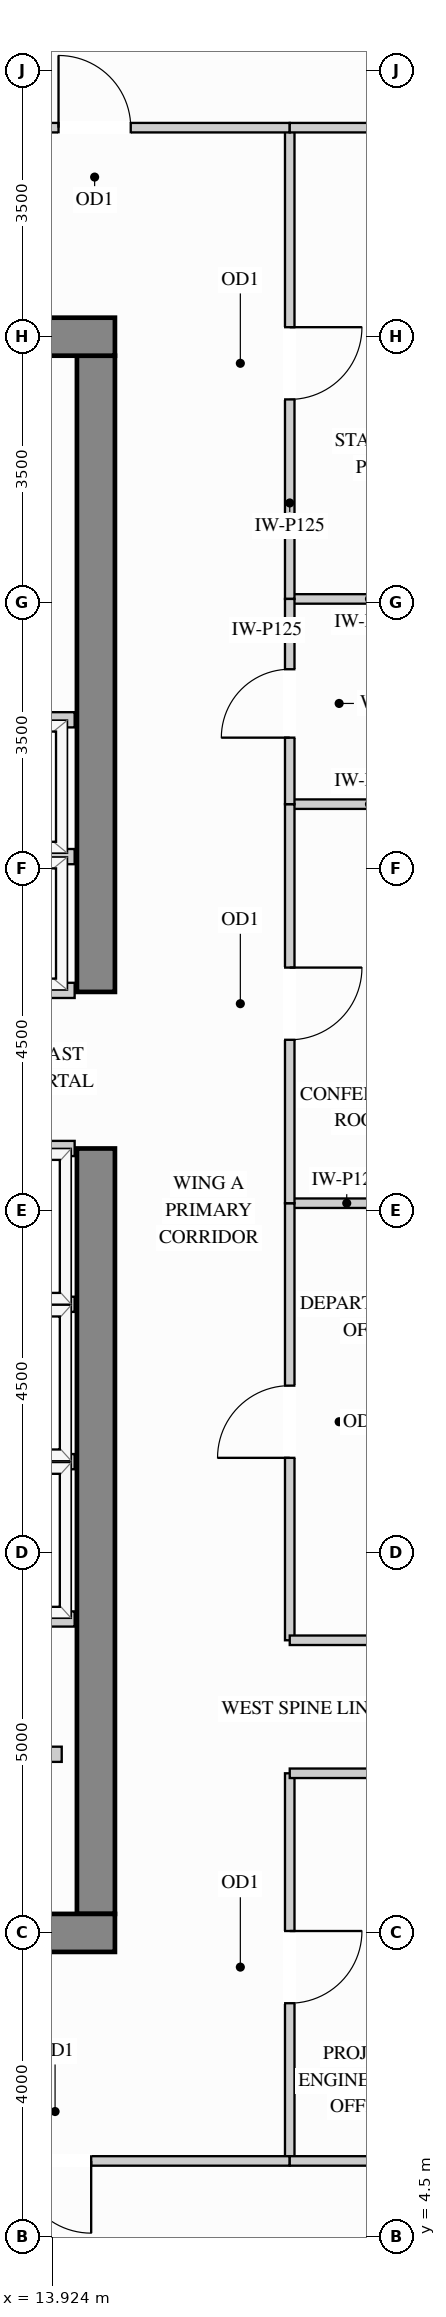
"""IFC4 building model, lengths in metres.
Left out: names, types, materials, properties, quantities, classifications, styles, units other than length and angle.
Written with IfcOpenShell. Run it as: python <this file> out.ifc"""

import sys

from ifc_helpers import new_model, si_unit, direction, frame, frame_2d, origin, place, context, subcontext, project, spatial, rectangle, extrude, source, transform, mapped, element, fill, save


model = new_model("IFC4")
c1 = context("Model", 3, precision=1e-05, world=origin(), true_north=direction((0.0, 1.0)))
c2 = subcontext(c1, "Body", "Model", "MODEL_VIEW")
j1 = project(units=[si_unit("LENGTHUNIT", "METRE"), si_unit("PLANEANGLEUNIT", "RADIAN")], contexts=[c1])
p1 = place(None, origin())
s1 = spatial("IfcSite", under=j1, at=p1, CompositionType="ELEMENT")
p2 = place(p1, origin())
s2 = spatial("IfcBuilding", under=s1, at=p2, CompositionType="ELEMENT")
p3 = place(p2, frame((0.0, 0.0, 237.6)))
s3 = spatial("IfcBuildingStorey", under=s2, at=p3, CompositionType="ELEMENT", Elevation=237.6)
m1 = source(origin(), c2, "Body", "SweptSolid", [
    extrude(rectangle(XDim=10.07, YDim=0.5, at=frame_2d((5.035, 0.0))), origin(), (0.0, 0.0, 1.0), 3.4),
])
p4 = place(p3, frame((14.5, 8.75, 0.0), z_axis=(0.0, 0.0, 1.0), x_axis=(0.0, 1.0, 0.0)))
e1 = element("IfcWall", 1, at=p4, inside=s3, PredefinedType="SHEAR", context=c2, shape_type="MappedRepresentation", body=[
    mapped(m1, transform((0.0, 0.0, 0.0), x_axis=(1.0, 0.0, 0.0), y_axis=(0.0, 1.0, 0.0), z_axis=(0.0, 0.0, 1.0))),
])
m2 = source(origin(), c2, "Body", "SweptSolid", [
    extrude(rectangle(XDim=8.37, YDim=0.5, at=frame_2d((4.185, 0.0))), origin(), (0.0, 0.0, 1.0), 3.4),
])
p5 = place(p3, frame((14.5, 20.88, 0.0), z_axis=(0.0, 0.0, 1.0), x_axis=(0.0, 1.0, 0.0)))
e2 = element("IfcWall", 2, at=p5, inside=s3, PredefinedType="SHEAR", context=c2, shape_type="MappedRepresentation", body=[
    mapped(m2, transform((0.0, 0.0, 0.0), x_axis=(1.0, 0.0, 0.0), y_axis=(0.0, 1.0, 0.0), z_axis=(0.0, 0.0, 1.0))),
])
m3 = source(origin(), c2, "Body", "SweptSolid", [
    extrude(rectangle(XDim=10.5, YDim=0.5, at=frame_2d((5.25, 0.0))), origin(), (0.0, 0.0, 1.0), 3.4),
])
for number, where, z_axis, x_axis in (
    (3, (4.25, 29.5, 0.0), (0.0, 0.0, 1.0), (1.0, 0.0, 0.0)),
    (4, (4.25, 8.5, 0.0), (0.0, 0.0, 1.0), (1.0, 0.0, 0.0)),
):
    element("IfcWall", number, at=place(p3, frame(where, z_axis=z_axis, x_axis=x_axis)), inside=s3, PredefinedType="SHEAR", context=c2, shape_type="MappedRepresentation", body=[
        mapped(m3, transform((0.0, 0.0, 0.0), x_axis=(1.0, 0.0, 0.0), y_axis=(0.0, 1.0, 0.0), z_axis=(0.0, 0.0, 1.0))),
    ])
m4 = source(origin(), c2, "Body", "SweptSolid", [
    extrude(rectangle(XDim=1.5, YDim=0.125, at=frame_2d((0.75, 0.0))), origin(), (0.0, 0.0, 1.0), 2.773),
])
p6 = place(p3, frame((17.05, 18.1, 0.0), z_axis=(0.0, 0.0, 1.0), x_axis=(1.0, 0.0, 0.0)))
e5 = element("IfcWall", 5, at=p6, inside=s3, PredefinedType="PARTITIONING", context=c2, shape_type="MappedRepresentation", body=[
    mapped(m4, transform((0.0, 0.0, 0.0), x_axis=(1.0, 0.0, 0.0), y_axis=(0.0, 1.0, 0.0), z_axis=(0.0, 0.0, 1.0))),
])
m5 = source(origin(), c2, "Body", "SweptSolid", [
    extrude(rectangle(XDim=2.098, YDim=0.125, at=frame_2d((1.049, 0.0))), origin(), (0.0, 0.0, 1.0), 3.385),
])
for number, where, z_axis, x_axis in (
    (6, (17.05, 23.35, 0.0), (0.0, 0.0, 1.0), (1.0, 0.0, 0.0)),
    (7, (17.05, 26.05, 0.0), (0.0, 0.0, 1.0), (1.0, 0.0, 0.0)),
):
    element("IfcWall", number, at=place(p3, frame(where, z_axis=z_axis, x_axis=x_axis)), inside=s3, PredefinedType="PARTITIONING", context=c2, shape_type="MappedRepresentation", body=[
        mapped(m5, transform((0.0, 0.0, 0.0), x_axis=(1.0, 0.0, 0.0), y_axis=(0.0, 1.0, 0.0), z_axis=(0.0, 0.0, 1.0))),
    ])
p7 = place(p3, frame((17.05, 12.35, 0.0), z_axis=(0.0, 0.0, 1.0), x_axis=(0.0, 1.0, 0.0)))
e8 = element("IfcWall", 8, at=p7, inside=s3, PredefinedType="PARTITIONING", context=c2, shape_type="SweptSolid", body=[
    extrude(rectangle(XDim=5.75, YDim=0.125, at=frame_2d((2.875, 0.0))), origin(), (0.0, 0.0, 1.0), 3.385),
])
p8 = place(p7, frame((2.4, 0.0, 0.0)))
e9 = element("IfcOpeningElement", 9, at=p8, cuts=e8, PredefinedType="OPENING", context=c2, shape_type="SweptSolid", body=[
    extrude(rectangle(XDim=0.95, YDim=2.15, at=frame_2d((0.475, 1.075))), frame((0.0, 0.073, 0.0), z_axis=(0.0, -1.0, 0.0), x_axis=(1.0, 0.0, 0.0)), (0.0, 0.0, 1.0), 0.145),
])
p9 = place(p3, frame((17.05, 18.1, 0.0), z_axis=(0.0, 0.0, 1.0), x_axis=(0.0, 1.0, 0.0)))
e10 = element("IfcWall", 10, at=p9, inside=s3, PredefinedType="PARTITIONING", context=c2, shape_type="SweptSolid", body=[
    extrude(rectangle(XDim=5.25, YDim=0.125, at=frame_2d((2.625, 0.0))), origin(), (0.0, 0.0, 1.0), 3.385),
])
p10 = place(p9, frame((2.15, 0.0, 0.0)))
e11 = element("IfcOpeningElement", 11, at=p10, cuts=e10, PredefinedType="OPENING", context=c2, shape_type="SweptSolid", body=[
    extrude(rectangle(XDim=0.95, YDim=2.15, at=frame_2d((0.475, 1.075))), frame((0.0, 0.073, 0.0), z_axis=(0.0, -1.0, 0.0), x_axis=(1.0, 0.0, 0.0)), (0.0, 0.0, 1.0), 0.145),
])
p11 = place(p3, frame((17.05, 26.05, 0.0), z_axis=(0.0, 0.0, 1.0), x_axis=(0.0, 1.0, 0.0)))
e12 = element("IfcWall", 12, at=p11, inside=s3, PredefinedType="PARTITIONING", context=c2, shape_type="SweptSolid", body=[
    extrude(rectangle(XDim=6.2, YDim=0.125, at=frame_2d((3.1, 0.0))), origin(), (0.0, 0.0, 1.0), 3.385),
])
p12 = place(p11, frame((2.625, 0.0, 0.0)))
e13 = element("IfcOpeningElement", 13, at=p12, cuts=e12, PredefinedType="OPENING", context=c2, shape_type="SweptSolid", body=[
    extrude(rectangle(XDim=0.95, YDim=2.15, at=frame_2d((0.475, 1.075))), frame((0.0, 0.073, 0.0), z_axis=(0.0, -1.0, 0.0), x_axis=(1.0, 0.0, 0.0)), (0.0, 0.0, 1.0), 0.145),
])
p13 = place(p3, frame((17.05, 5.5, 0.0), z_axis=(0.0, 0.0, 1.0), x_axis=(0.0, 1.0, 0.0)))
e14 = element("IfcWall", 14, at=p13, inside=s3, PredefinedType="PARTITIONING", context=c2, shape_type="SweptSolid", body=[
    extrude(rectangle(XDim=5.1, YDim=0.125, at=frame_2d((2.55, 0.0))), origin(), (0.0, 0.0, 1.0), 3.385),
])
p14 = place(p13, frame((2.075, 0.0, 0.0)))
e15 = element("IfcOpeningElement", 15, at=p14, cuts=e14, PredefinedType="OPENING", context=c2, shape_type="SweptSolid", body=[
    extrude(rectangle(XDim=0.95, YDim=2.15, at=frame_2d((0.475, 1.075))), frame((0.0, 0.073, 0.0), z_axis=(0.0, -1.0, 0.0), x_axis=(1.0, 0.0, 0.0)), (0.0, 0.0, 1.0), 0.145),
])
p15 = place(p3, frame((17.05, 23.35, 0.0), z_axis=(0.0, 0.0, 1.0), x_axis=(0.0, 1.0, 0.0)))
e16 = element("IfcWall", 16, at=p15, inside=s3, PredefinedType="PARTITIONING", context=c2, shape_type="SweptSolid", body=[
    extrude(rectangle(XDim=2.7, YDim=0.125, at=frame_2d((1.35, 0.0))), origin(), (0.0, 0.0, 1.0), 3.385),
])
p16 = place(p15, frame((0.875, 0.0, 0.0)))
e17 = element("IfcOpeningElement", 17, at=p16, cuts=e16, PredefinedType="OPENING", context=c2, shape_type="SweptSolid", body=[
    extrude(rectangle(XDim=0.9, YDim=2.15, at=frame_2d((0.45, 1.075))), frame((0.0, 0.073, 0.0), z_axis=(0.0, -1.0, 0.0), x_axis=(1.0, 0.0, 0.0)), (0.0, 0.0, 1.0), 0.145),
])
p17 = place(p3, frame((11.916, 32.25, 0.0), z_axis=(0.0, 0.0, 1.0), x_axis=(1.0, 0.0, 0.0)))
e18 = element("IfcWall", 18, at=p17, inside=s3, PredefinedType="PARTITIONING", context=c2, shape_type="SweptSolid", body=[
    extrude(rectangle(XDim=5.134, YDim=0.125, at=frame_2d((2.567, 0.0))), origin(), (0.0, 0.0, 1.0), 3.385),
])
p18 = place(p17, frame((2.092, 0.0, 0.0)))
e19 = element("IfcOpeningElement", 19, at=p18, cuts=e18, PredefinedType="OPENING", context=c2, shape_type="SweptSolid", body=[
    extrude(rectangle(XDim=0.95, YDim=2.15, at=frame_2d((0.475, 1.075))), frame((0.0, 0.073, 0.0), z_axis=(0.0, -1.0, 0.0), x_axis=(1.0, 0.0, 0.0)), (0.0, 0.0, 1.0), 0.145),
])
p19 = place(p3, frame((17.05, 32.25, 0.0), z_axis=(0.0, 0.0, 1.0), x_axis=(1.0, 0.0, 0.0)))
e20 = element("IfcWall", 20, at=p19, inside=s3, PredefinedType="PARTITIONING", context=c2, shape_type="MappedRepresentation", body=[
    mapped(m5, transform((0.0, 0.0, 0.0), x_axis=(1.0, 0.0, 0.0), y_axis=(0.0, 1.0, 0.0), z_axis=(0.0, 0.0, 1.0))),
])
m6 = source(origin(), c2, "Body", "SweptSolid", [
    extrude(rectangle(XDim=2.45, YDim=0.125, at=frame_2d((1.225, 0.0))), origin(), (0.0, 0.0, 1.0), 3.385),
])
for number, where, z_axis, x_axis in (
    (21, (17.05, 12.35, 0.0), (0.0, 0.0, 1.0), (1.0, 0.0, 0.0)),
    (22, (17.05, 10.6, 0.0), (0.0, 0.0, 1.0), (1.0, 0.0, 0.0)),
):
    element("IfcWall", number, at=place(p3, frame(where, z_axis=z_axis, x_axis=x_axis)), inside=s3, PredefinedType="PARTITIONING", context=c2, shape_type="MappedRepresentation", body=[
        mapped(m6, transform((0.0, 0.0, 0.0), x_axis=(1.0, 0.0, 0.0), y_axis=(0.0, 1.0, 0.0), z_axis=(0.0, 0.0, 1.0))),
    ])
p20 = place(p3, frame((10.875, 5.5, 0.0), z_axis=(0.0, 0.0, 1.0), x_axis=(1.0, 0.0, 0.0)))
e23 = element("IfcWall", 23, at=p20, inside=s3, PredefinedType="PARTITIONING", context=c2, shape_type="SweptSolid", body=[
    extrude(rectangle(XDim=6.175, YDim=0.125, at=frame_2d((3.087, 0.0))), origin(), (0.0, 0.0, 1.0), 3.385),
])
p21 = place(p20, frame((2.613, 0.0, 0.0)))
e24 = element("IfcOpeningElement", 24, at=p21, cuts=e23, PredefinedType="OPENING", context=c2, shape_type="SweptSolid", body=[
    extrude(rectangle(XDim=0.95, YDim=2.15, at=frame_2d((0.475, 1.075))), frame((0.0, 0.073, 0.0), z_axis=(0.0, -1.0, 0.0), x_axis=(1.0, 0.0, 0.0)), (0.0, 0.0, 1.0), 0.145),
])
p22 = place(p3, frame((17.05, 5.5, 0.0), z_axis=(0.0, 0.0, 1.0), x_axis=(1.0, 0.0, 0.0)))
e25 = element("IfcWall", 25, at=p22, inside=s3, PredefinedType="PARTITIONING", context=c2, shape_type="MappedRepresentation", body=[
    mapped(m5, transform((0.0, 0.0, 0.0), x_axis=(1.0, 0.0, 0.0), y_axis=(0.0, 1.0, 0.0), z_axis=(0.0, 0.0, 1.0))),
])
m7 = source(origin(), c2, "Body", "SweptSolid", [
    extrude(rectangle(XDim=1.63, YDim=0.2, at=frame_2d((0.815, 0.0))), origin(), (0.0, 0.0, 1.0), 3.385),
])
p23 = place(p3, frame((12.42, 10.85, 0.0), z_axis=(0.0, 0.0, 1.0), x_axis=(1.0, 0.0, 0.0)))
e26 = element("IfcWall", 26, at=p23, inside=s3, PredefinedType="PARTITIONING", context=c2, shape_type="MappedRepresentation", body=[
    mapped(m7, transform((0.0, 0.0, 0.0), x_axis=(1.0, 0.0, 0.0), y_axis=(0.0, 1.0, 0.0), z_axis=(0.0, 0.0, 1.0))),
])
m8 = source(origin(), c2, "Body", "SweptSolid", [
    extrude(rectangle(XDim=2.39, YDim=0.2, at=frame_2d((1.195, 0.0))), origin(), (0.0, 0.0, 1.0), 3.385),
])
for number, where, z_axis, x_axis in (
    (27, (11.83, 22.66, 0.0), (0.0, 0.0, 1.0), (1.0, 0.0, 0.0)),
    (28, (11.83, 20.9, 0.0), (0.0, 0.0, 1.0), (1.0, 0.0, 0.0)),
    (29, (11.83, 24.46, 0.0), (0.0, 0.0, 1.0), (1.0, 0.0, 0.0)),
):
    element("IfcWall", number, at=place(p3, frame(where, z_axis=z_axis, x_axis=x_axis)), inside=s3, PredefinedType="PARTITIONING", context=c2, shape_type="MappedRepresentation", body=[
        mapped(m8, transform((0.0, 0.0, 0.0), x_axis=(1.0, 0.0, 0.0), y_axis=(0.0, 1.0, 0.0), z_axis=(0.0, 0.0, 1.0))),
    ])
m9 = source(origin(), c2, "Body", "SweptSolid", [
    extrude(rectangle(XDim=1.99, YDim=0.2, at=frame_2d((0.995, 0.0))), origin(), (0.0, 0.0, 1.0), 3.385),
])
for number, where, z_axis, x_axis in (
    (30, (12.23, 14.7, 0.0), (0.0, 0.0, 1.0), (1.0, 0.0, 0.0)),
    (31, (12.23, 12.63, 0.0), (0.0, 0.0, 1.0), (1.0, 0.0, 0.0)),
    (32, (12.23, 16.77, 0.0), (0.0, 0.0, 1.0), (1.0, 0.0, 0.0)),
    (33, (12.23, 18.82, 0.0), (0.0, 0.0, 1.0), (1.0, 0.0, 0.0)),
):
    element("IfcWall", number, at=place(p3, frame(where, z_axis=z_axis, x_axis=x_axis)), inside=s3, PredefinedType="PARTITIONING", context=c2, shape_type="MappedRepresentation", body=[
        mapped(m9, transform((0.0, 0.0, 0.0), x_axis=(1.0, 0.0, 0.0), y_axis=(0.0, 1.0, 0.0), z_axis=(0.0, 0.0, 1.0))),
    ])
m10 = source(origin(), c2, "Body", "SweptSolid", [
    extrude(rectangle(XDim=0.95, YDim=2.15, at=frame_2d((0.475, 1.075))), frame((0.0, 0.025, 0.0), z_axis=(0.0, -1.0, 0.0), x_axis=(1.0, 0.0, 0.0)), (0.0, 0.0, 1.0), 0.05),
])
p24 = place(p14, origin())
e34 = element("IfcDoor", 34, at=p24, inside=s3, OperationType="SINGLE_SWING_RIGHT", PredefinedType="DOOR", context=c2, shape_type="MappedRepresentation", body=[
    mapped(m10, transform((0.0, 0.0, 0.0), x_axis=(1.0, 0.0, 0.0), y_axis=(0.0, 1.0, 0.0), z_axis=(0.0, 0.0, 1.0))),
])
fill(e15, e34)
p25 = place(p8, origin())
e35 = element("IfcDoor", 35, at=p25, inside=s3, OperationType="SINGLE_SWING_LEFT", PredefinedType="DOOR", context=c2, shape_type="MappedRepresentation", body=[
    mapped(m10, transform((0.0, 0.0, 0.0), x_axis=(1.0, 0.0, 0.0), y_axis=(0.0, 1.0, 0.0), z_axis=(0.0, 0.0, 1.0))),
])
fill(e9, e35)
p26 = place(p10, origin())
e36 = element("IfcDoor", 36, at=p26, inside=s3, OperationType="SINGLE_SWING_RIGHT", PredefinedType="DOOR", context=c2, shape_type="MappedRepresentation", body=[
    mapped(m10, transform((0.0, 0.0, 0.0), x_axis=(1.0, 0.0, 0.0), y_axis=(0.0, 1.0, 0.0), z_axis=(0.0, 0.0, 1.0))),
])
fill(e11, e36)
p27 = place(p12, origin())
e37 = element("IfcDoor", 37, at=p27, inside=s3, OperationType="SINGLE_SWING_RIGHT", PredefinedType="DOOR", context=c2, shape_type="MappedRepresentation", body=[
    mapped(m10, transform((0.0, 0.0, 0.0), x_axis=(1.0, 0.0, 0.0), y_axis=(0.0, 1.0, 0.0), z_axis=(0.0, 0.0, 1.0))),
])
fill(e13, e37)
p28 = place(p18, origin())
e38 = element("IfcDoor", 38, at=p28, inside=s3, OperationType="SINGLE_SWING_LEFT", PredefinedType="DOOR", context=c2, shape_type="MappedRepresentation", body=[
    mapped(m10, transform((0.0, 0.0, 0.0), x_axis=(1.0, 0.0, 0.0), y_axis=(0.0, 1.0, 0.0), z_axis=(0.0, 0.0, 1.0))),
])
fill(e19, e38)
p29 = place(p21, origin())
e39 = element("IfcDoor", 39, at=p29, inside=s3, OperationType="SINGLE_SWING_RIGHT", PredefinedType="DOOR", context=c2, shape_type="MappedRepresentation", body=[
    mapped(m10, transform((0.0, 0.0, 0.0), x_axis=(1.0, 0.0, 0.0), y_axis=(0.0, 1.0, 0.0), z_axis=(0.0, 0.0, 1.0))),
])
fill(e24, e39)
m11 = source(origin(), c2, "Body", "SweptSolid", [
    extrude(rectangle(XDim=0.9, YDim=2.15, at=frame_2d((0.45, 1.075))), frame((0.0, 0.025, 0.0), z_axis=(0.0, -1.0, 0.0), x_axis=(1.0, 0.0, 0.0)), (0.0, 0.0, 1.0), 0.05),
])
p30 = place(p16, origin())
e40 = element("IfcDoor", 40, at=p30, inside=s3, OperationType="SINGLE_SWING_LEFT", PredefinedType="DOOR", context=c2, shape_type="MappedRepresentation", body=[
    mapped(m11, transform((0.0, 0.0, 0.0), x_axis=(1.0, 0.0, 0.0), y_axis=(0.0, 1.0, 0.0), z_axis=(0.0, 0.0, 1.0))),
])
fill(e17, e40)
save(model, sys.argv[1])
